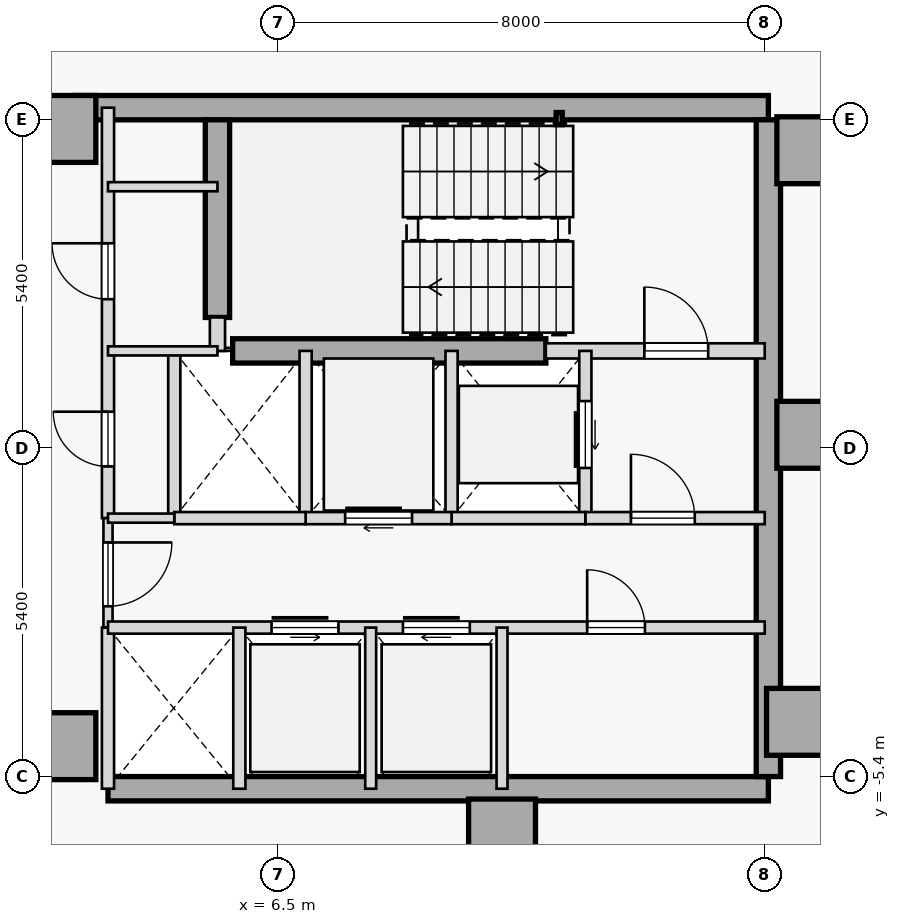
"""IFC4 building model, lengths in metres.
Left out: names, types, materials, properties, quantities, classifications, styles, units other than length and angle.
Written with IfcOpenShell. Run it as: python <this file> out.ifc"""

import sys

from ifc_helpers import new_model, si_unit, direction, frame, frame_2d, origin, origin_2d, place, context, subcontext, project, spatial, rectangle, hollow_rectangle, extrude, element, fill, save


model = new_model("IFC4")
c1 = context("Model", 3, precision=1e-05, world=origin(), true_north=direction((0.0, 1.0)))
c2 = subcontext(c1, "Body", "Model", "MODEL_VIEW")
j1 = project(units=[si_unit("LENGTHUNIT", "METRE"), si_unit("PLANEANGLEUNIT", "RADIAN")], contexts=[c1])
p1 = place(None, origin())
s1 = spatial("IfcSite", under=j1, at=p1, CompositionType="ELEMENT")
p2 = place(p1, origin())
s2 = spatial("IfcBuilding", under=s1, at=p2, CompositionType="ELEMENT")
p3 = place(p2, frame((0.0, 0.0, 117.0)))
s3 = spatial("IfcBuildingStorey", under=s2, at=p3, CompositionType="ELEMENT", Elevation=117.0)
for number, where, z_axis, x_axis in (
    (1, (15.25, 4.9, 0.0), (0.0, 0.0, 1.0), (1.0, 0.0, 0.0)),
    (2, (15.25, 0.22, 0.0), (0.0, 0.0, 1.0), (1.0, 0.0, 0.0)),
    (3, (15.08, -4.5, 0.0), (0.0, 0.0, 1.0), (1.0, 0.0, 0.0)),
    (4, (10.18, -6.32, 0.0), (0.0, 0.0, 1.0), (1.0, 0.0, 0.0)),
    (5, (2.95, -4.9, 0.0), (0.0, 0.0, 1.0), (1.0, 0.0, 0.0)),
    (6, (2.95, 5.25, 0.0), (0.0, 0.0, 1.0), (1.0, 0.0, 0.0)),
):
    element("IfcColumn", number, at=place(p3, frame(where, z_axis=z_axis, x_axis=x_axis)), inside=s3, PredefinedType="COLUMN", context=c2, shape_type="SweptSolid", body=[
        extrude(rectangle(XDim=1.1, YDim=1.1, at=origin_2d()), origin(), (0.0, 0.0, 1.0), 3.7),
    ])
p4 = place(p3, frame((3.15, 5.6, 0.0), z_axis=(0.0, 0.0, 1.0), x_axis=(1.0, 0.0, 0.0)))
e7 = element("IfcWall", 7, at=p4, inside=s3, PredefinedType="SHEAR", context=c2, shape_type="SweptSolid", body=[
    extrude(rectangle(XDim=11.41, YDim=0.4, at=frame_2d((5.705, 0.0))), origin(), (0.0, 0.0, 1.0), 3.475),
])
p5 = place(p3, frame((3.7, -5.6, 0.0), z_axis=(0.0, 0.0, 1.0), x_axis=(1.0, 0.0, 0.0)))
e8 = element("IfcWall", 8, at=p5, inside=s3, PredefinedType="SHEAR", context=c2, shape_type="SweptSolid", body=[
    extrude(rectangle(XDim=10.86, YDim=0.4, at=frame_2d((5.43, 0.0))), origin(), (0.0, 0.0, 1.0), 3.475),
])
p6 = place(p3, frame((14.56, -5.4, 0.0), z_axis=(0.0, 0.0, 1.0), x_axis=(0.0, 1.0, 0.0)))
e9 = element("IfcWall", 9, at=p6, inside=s3, PredefinedType="SHEAR", context=c2, shape_type="SweptSolid", body=[
    extrude(rectangle(XDim=10.8, YDim=0.4, at=frame_2d((5.4, 0.0))), origin(), (0.0, 0.0, 1.0), 3.475),
])
p7 = place(p3, frame((5.5, 2.15, 0.0), z_axis=(0.0, 0.0, 1.0), x_axis=(0.0, 1.0, 0.0)))
e10 = element("IfcWall", 10, at=p7, inside=s3, PredefinedType="SHEAR", context=c2, shape_type="SweptSolid", body=[
    extrude(rectangle(XDim=3.25, YDim=0.4, at=frame_2d((1.625, 0.0))), origin(), (0.0, 0.0, 1.0), 3.475),
])
p8 = place(p3, frame((5.75, 1.6, 0.0), z_axis=(0.0, 0.0, 1.0), x_axis=(1.0, 0.0, 0.0)))
e11 = element("IfcWall", 11, at=p8, inside=s3, PredefinedType="SHEAR", context=c2, shape_type="SweptSolid", body=[
    extrude(rectangle(XDim=5.15, YDim=0.4, at=frame_2d((2.575, 0.0))), origin(), (0.0, 0.0, 1.0), 3.475),
])
p9 = place(p3, frame((11.12, 5.42, 0.0), z_axis=(0.0, 0.0, 1.0), x_axis=(1.0, 0.0, 0.0)))
e12 = element("IfcColumn", 12, at=p9, inside=s3, PredefinedType="COLUMN", context=c2, shape_type="SweptSolid", body=[
    extrude(hollow_rectangle(XDim=0.1, YDim=0.2, WallThickness=0.008, at=origin_2d()), origin(), (0.0, 0.0, 1.0), 3.7),
])
p10 = place(p3, frame((10.9, 1.6, 0.0), z_axis=(0.0, 0.0, 1.0), x_axis=(1.0, 0.0, 0.0)))
e13 = element("IfcWall", 13, at=p10, inside=s3, PredefinedType="STANDARD", context=c2, shape_type="SweptSolid", body=[
    extrude(rectangle(XDim=3.6, YDim=0.25, at=frame_2d((1.8, 0.0))), origin(), (0.0, 0.0, 1.0), 3.475),
])
p11 = place(p10, frame((1.62, 0.0, 0.0)))
e14 = element("IfcOpeningElement", 14, at=p11, cuts=e13, PredefinedType="OPENING", context=c2, shape_type="SweptSolid", body=[
    extrude(rectangle(XDim=1.05, YDim=2.15, at=frame_2d((0.525, 1.075))), frame((0.0, 0.135, 0.0), z_axis=(0.0, -1.0, 0.0), x_axis=(1.0, 0.0, 0.0)), (0.0, 0.0, 1.0), 0.27),
])
p12 = place(p3, frame((5.5, 1.6, 0.0), z_axis=(0.0, 0.0, 1.0), x_axis=(0.0, 1.0, 0.0)))
e15 = element("IfcWall", 15, at=p12, inside=s3, PredefinedType="STANDARD", context=c2, shape_type="SweptSolid", body=[
    extrude(rectangle(XDim=0.55, YDim=0.25, at=frame_2d((0.275, 0.0))), origin(), (0.0, 0.0, 1.0), 3.475),
])
p13 = place(p3, frame((3.7, -1.15, 0.0), z_axis=(0.0, 0.0, 1.0), x_axis=(0.0, 1.0, 0.0)))
e16 = element("IfcWall", 16, at=p13, inside=s3, PredefinedType="STANDARD", context=c2, shape_type="SweptSolid", body=[
    extrude(rectangle(XDim=6.75, YDim=0.2, at=frame_2d((3.375, 0.0))), origin(), (0.0, 0.0, 1.0), 3.475),
])
p14 = place(p13, frame((3.6, 0.0, 0.0)))
e17 = element("IfcOpeningElement", 17, at=p14, cuts=e16, PredefinedType="OPENING", context=c2, shape_type="SweptSolid", body=[
    extrude(rectangle(XDim=0.92, YDim=2.15, at=frame_2d((0.46, 1.075))), frame((0.0, 0.11, 0.0), z_axis=(0.0, -1.0, 0.0), x_axis=(1.0, 0.0, 0.0)), (0.0, 0.0, 1.0), 0.22),
])
p15 = place(p13, frame((0.85, 0.0, 0.0)))
e18 = element("IfcOpeningElement", 18, at=p15, cuts=e16, PredefinedType="OPENING", context=c2, shape_type="SweptSolid", body=[
    extrude(rectangle(XDim=0.9, YDim=2.15, at=frame_2d((0.45, 1.075))), frame((0.0, 0.11, 0.0), z_axis=(0.0, -1.0, 0.0), x_axis=(1.0, 0.0, 0.0)), (0.0, 0.0, 1.0), 0.22),
])
p16 = place(p3, frame((3.7, -2.95, 0.0), z_axis=(0.0, 0.0, 1.0), x_axis=(0.0, 1.0, 0.0)))
e19 = element("IfcWall", 19, at=p16, inside=s3, PredefinedType="PARTITIONING", context=c2, shape_type="SweptSolid", body=[
    extrude(rectangle(XDim=1.8, YDim=0.15, at=frame_2d((0.9, 0.0))), origin(), (0.0, 0.0, 1.0), 3.475),
])
p17 = place(p16, frame((0.35, 0.0, 0.0)))
e20 = element("IfcOpeningElement", 20, at=p17, cuts=e19, PredefinedType="OPENING", context=c2, shape_type="SweptSolid", body=[
    extrude(rectangle(XDim=1.05, YDim=2.18, at=frame_2d((0.525, 1.09))), frame((0.0, 0.085, 0.0), z_axis=(0.0, -1.0, 0.0), x_axis=(1.0, 0.0, 0.0)), (0.0, 0.0, 1.0), 0.17),
])
p18 = place(p3, frame((3.7, -5.6, 0.0), z_axis=(0.0, 0.0, 1.0), x_axis=(0.0, 1.0, 0.0)))
e21 = element("IfcWall", 21, at=p18, inside=s3, PredefinedType="STANDARD", context=c2, shape_type="SweptSolid", body=[
    extrude(rectangle(XDim=2.65, YDim=0.2, at=frame_2d((1.325, 0.0))), origin(), (0.0, 0.0, 1.0), 3.475),
])
p19 = place(p3, frame((11.55, -1.15, 0.0), z_axis=(0.0, 0.0, 1.0), x_axis=(0.0, 1.0, 0.0)))
e22 = element("IfcWall", 22, at=p19, inside=s3, PredefinedType="STANDARD", context=c2, shape_type="SweptSolid", body=[
    extrude(rectangle(XDim=2.75, YDim=0.2, at=frame_2d((1.375, 0.0))), origin(), (0.0, 0.0, 1.0), 3.475),
])
p20 = place(p19, frame((0.825, 0.0, 0.0)))
e23 = element("IfcOpeningElement", 23, at=p20, cuts=e22, PredefinedType="OPENING", context=c2, shape_type="SweptSolid", body=[
    extrude(rectangle(XDim=1.1, YDim=2.15, at=frame_2d((0.55, 1.075))), frame((0.0, 0.11, 0.0), z_axis=(0.0, -1.0, 0.0), x_axis=(1.0, 0.0, 0.0)), (0.0, 0.0, 1.0), 0.22),
])
p21 = place(p3, frame((9.35, -1.15, 0.0), z_axis=(0.0, 0.0, 1.0), x_axis=(0.0, 1.0, 0.0)))
e24 = element("IfcWall", 24, at=p21, inside=s3, PredefinedType="STANDARD", context=c2, shape_type="SweptSolid", body=[
    extrude(rectangle(XDim=2.75, YDim=0.2, at=frame_2d((1.375, 0.0))), origin(), (0.0, 0.0, 1.0), 3.475),
])
p22 = place(p3, frame((11.55, -1.15, 0.0), z_axis=(0.0, 0.0, 1.0), x_axis=(1.0, 0.0, 0.0)))
e25 = element("IfcWall", 25, at=p22, inside=s3, PredefinedType="STANDARD", context=c2, shape_type="SweptSolid", body=[
    extrude(rectangle(XDim=2.95, YDim=0.2, at=frame_2d((1.475, 0.0))), origin(), (0.0, 0.0, 1.0), 3.475),
])
p23 = place(p22, frame((0.75, 0.0, 0.0)))
e26 = element("IfcOpeningElement", 26, at=p23, cuts=e25, PredefinedType="OPENING", context=c2, shape_type="SweptSolid", body=[
    extrude(rectangle(XDim=1.05, YDim=2.18, at=frame_2d((0.525, 1.09))), frame((0.0, 0.11, 0.0), z_axis=(0.0, -1.0, 0.0), x_axis=(1.0, 0.0, 0.0)), (0.0, 0.0, 1.0), 0.22),
])
p24 = place(p3, frame((9.35, -1.15, 0.0), z_axis=(0.0, 0.0, 1.0), x_axis=(1.0, 0.0, 0.0)))
e27 = element("IfcWall", 27, at=p24, inside=s3, PredefinedType="STANDARD", context=c2, shape_type="SweptSolid", body=[
    extrude(rectangle(XDim=2.2, YDim=0.2, at=frame_2d((1.1, 0.0))), origin(), (0.0, 0.0, 1.0), 3.475),
])
p25 = place(p3, frame((6.95, -1.15, 0.0), z_axis=(0.0, 0.0, 1.0), x_axis=(0.0, 1.0, 0.0)))
e28 = element("IfcWall", 28, at=p25, inside=s3, PredefinedType="STANDARD", context=c2, shape_type="SweptSolid", body=[
    extrude(rectangle(XDim=2.75, YDim=0.2, at=frame_2d((1.375, 0.0))), origin(), (0.0, 0.0, 1.0), 3.475),
])
p26 = place(p3, frame((6.95, -1.15, 0.0), z_axis=(0.0, 0.0, 1.0), x_axis=(1.0, 0.0, 0.0)))
e29 = element("IfcWall", 29, at=p26, inside=s3, PredefinedType="STANDARD", context=c2, shape_type="SweptSolid", body=[
    extrude(rectangle(XDim=2.4, YDim=0.2, at=frame_2d((1.2, 0.0))), origin(), (0.0, 0.0, 1.0), 3.475),
])
p27 = place(p26, frame((0.65, 0.0, 0.0)))
e30 = element("IfcOpeningElement", 30, at=p27, cuts=e29, PredefinedType="OPENING", context=c2, shape_type="SweptSolid", body=[
    extrude(rectangle(XDim=1.1, YDim=2.15, at=frame_2d((0.55, 1.075))), frame((0.0, 0.11, 0.0), z_axis=(0.0, -1.0, 0.0), x_axis=(1.0, 0.0, 0.0)), (0.0, 0.0, 1.0), 0.22),
])
p28 = place(p3, frame((4.79, -1.15, 0.0), z_axis=(0.0, 0.0, 1.0), x_axis=(0.0, 1.0, 0.0)))
e31 = element("IfcWall", 31, at=p28, inside=s3, PredefinedType="STANDARD", context=c2, shape_type="SweptSolid", body=[
    extrude(rectangle(XDim=2.75, YDim=0.2, at=frame_2d((1.375, 0.0))), origin(), (0.0, 0.0, 1.0), 3.475),
])
p29 = place(p3, frame((4.79, -1.15, 0.0), z_axis=(0.0, 0.0, 1.0), x_axis=(1.0, 0.0, 0.0)))
e32 = element("IfcWall", 32, at=p29, inside=s3, PredefinedType="STANDARD", context=c2, shape_type="SweptSolid", body=[
    extrude(rectangle(XDim=2.16, YDim=0.2, at=frame_2d((1.08, 0.0))), origin(), (0.0, 0.0, 1.0), 3.475),
])
p30 = place(p3, frame((3.7, -1.15, 0.0), z_axis=(0.0, 0.0, 1.0), x_axis=(1.0, 0.0, 0.0)))
e33 = element("IfcWall", 33, at=p30, inside=s3, PredefinedType="PARTITIONING", context=c2, shape_type="SweptSolid", body=[
    extrude(rectangle(XDim=1.09, YDim=0.15, at=frame_2d((0.545, 0.0))), origin(), (0.0, 0.0, 1.0), 3.475),
])
p31 = place(p3, frame((3.7, -2.95, 0.0), z_axis=(0.0, 0.0, 1.0), x_axis=(1.0, 0.0, 0.0)))
e34 = element("IfcWall", 34, at=p31, inside=s3, PredefinedType="STANDARD", context=c2, shape_type="SweptSolid", body=[
    extrude(rectangle(XDim=10.8, YDim=0.2, at=frame_2d((5.4, 0.0))), origin(), (0.0, 0.0, 1.0), 3.475),
])
p32 = place(p31, frame((2.69, 0.0, 0.0)))
e35 = element("IfcOpeningElement", 35, at=p32, cuts=e34, PredefinedType="OPENING", context=c2, shape_type="SweptSolid", body=[
    extrude(rectangle(XDim=1.1, YDim=2.15, at=frame_2d((0.55, 1.075))), frame((0.0, 0.11, 0.0), z_axis=(0.0, -1.0, 0.0), x_axis=(1.0, 0.0, 0.0)), (0.0, 0.0, 1.0), 0.22),
])
p33 = place(p31, frame((4.85, 0.0, 0.0)))
e36 = element("IfcOpeningElement", 36, at=p33, cuts=e34, PredefinedType="OPENING", context=c2, shape_type="SweptSolid", body=[
    extrude(rectangle(XDim=1.1, YDim=2.15, at=frame_2d((0.55, 1.075))), frame((0.0, 0.11, 0.0), z_axis=(0.0, -1.0, 0.0), x_axis=(1.0, 0.0, 0.0)), (0.0, 0.0, 1.0), 0.22),
])
p34 = place(p31, frame((7.88, 0.0, 0.0)))
e37 = element("IfcOpeningElement", 37, at=p34, cuts=e34, PredefinedType="OPENING", context=c2, shape_type="SweptSolid", body=[
    extrude(rectangle(XDim=0.95, YDim=2.15, at=frame_2d((0.475, 1.075))), frame((0.0, 0.11, 0.0), z_axis=(0.0, -1.0, 0.0), x_axis=(1.0, 0.0, 0.0)), (0.0, 0.0, 1.0), 0.22),
])
p35 = place(p3, frame((5.86, -5.6, 0.0), z_axis=(0.0, 0.0, 1.0), x_axis=(0.0, 1.0, 0.0)))
e38 = element("IfcWall", 38, at=p35, inside=s3, PredefinedType="STANDARD", context=c2, shape_type="SweptSolid", body=[
    extrude(rectangle(XDim=2.65, YDim=0.2, at=frame_2d((1.325, 0.0))), origin(), (0.0, 0.0, 1.0), 3.475),
])
for number, where, z_axis, x_axis in (
    (39, (10.18, -5.6, 0.0), (0.0, 0.0, 1.0), (0.0, 1.0, 0.0)),
    (40, (8.02, -5.6, 0.0), (0.0, 0.0, 1.0), (0.0, 1.0, 0.0)),
):
    element("IfcWall", number, at=place(p3, frame(where, z_axis=z_axis, x_axis=x_axis)), inside=s3, PredefinedType="STANDARD", context=c2, shape_type="SweptSolid", body=[
        extrude(rectangle(XDim=2.65, YDim=0.18, at=frame_2d((1.325, 0.0))), origin(), (0.0, 0.0, 1.0), 3.475),
    ])
for number, where, z_axis, x_axis in (
    (41, (3.7, 4.3, 0.0), (0.0, 0.0, 1.0), (1.0, 0.0, 0.0)),
    (42, (3.7, 1.6, 0.0), (0.0, 0.0, 1.0), (1.0, 0.0, 0.0)),
):
    element("IfcWall", number, at=place(p3, frame(where, z_axis=z_axis, x_axis=x_axis)), inside=s3, PredefinedType="PARTITIONING", context=c2, shape_type="SweptSolid", body=[
        extrude(rectangle(XDim=1.8, YDim=0.15, at=frame_2d((0.9, 0.0))), origin(), (0.0, 0.0, 1.0), 3.475),
    ])
p36 = place(p11, origin())
e43 = element("IfcDoor", 43, at=p36, inside=s3, OperationType="SINGLE_SWING_LEFT", PredefinedType="DOOR", context=c2, shape_type="SweptSolid", body=[
    extrude(rectangle(XDim=1.05, YDim=2.15, at=frame_2d((0.525, 1.075))), frame((0.0, 0.025, 0.0), z_axis=(0.0, -1.0, 0.0), x_axis=(1.0, 0.0, 0.0)), (0.0, 0.0, 1.0), 0.05),
])
fill(e14, e43)
p37 = place(p23, origin())
e44 = element("IfcDoor", 44, at=p37, inside=s3, OperationType="SINGLE_SWING_LEFT", PredefinedType="DOOR", context=c2, shape_type="SweptSolid", body=[
    extrude(rectangle(XDim=1.05, YDim=2.18, at=frame_2d((0.525, 1.09))), frame((0.0, 0.025, 0.0), z_axis=(0.0, -1.0, 0.0), x_axis=(1.0, 0.0, 0.0)), (0.0, 0.0, 1.0), 0.05),
])
fill(e26, e44)
p38 = place(p17, frame((1.05, 0.0, 0.0), z_axis=(0.0, 0.0, 1.0), x_axis=(-1.0, 0.0, 0.0)))
e45 = element("IfcDoor", 45, at=p38, inside=s3, OperationType="SINGLE_SWING_RIGHT", PredefinedType="DOOR", context=c2, shape_type="SweptSolid", body=[
    extrude(rectangle(XDim=1.05, YDim=2.18, at=frame_2d((0.525, 1.09))), frame((0.0, 0.025, 0.0), z_axis=(0.0, -1.0, 0.0), x_axis=(1.0, 0.0, 0.0)), (0.0, 0.0, 1.0), 0.05),
])
fill(e20, e45)
p39 = place(p20, origin())
e46 = element("IfcDoor", 46, at=p39, inside=s3, OperationType="SLIDING_TO_RIGHT", PredefinedType="DOOR", context=c2, shape_type="SweptSolid", body=[
    extrude(rectangle(XDim=1.1, YDim=2.15, at=frame_2d((0.55, 1.075))), frame((0.0, 0.025, 0.0), z_axis=(0.0, -1.0, 0.0), x_axis=(1.0, 0.0, 0.0)), (0.0, 0.0, 1.0), 0.05),
])
fill(e23, e46)
p40 = place(p27, origin())
e47 = element("IfcDoor", 47, at=p40, inside=s3, OperationType="SLIDING_TO_RIGHT", PredefinedType="DOOR", context=c2, shape_type="SweptSolid", body=[
    extrude(rectangle(XDim=1.1, YDim=2.15, at=frame_2d((0.55, 1.075))), frame((0.0, 0.025, 0.0), z_axis=(0.0, -1.0, 0.0), x_axis=(1.0, 0.0, 0.0)), (0.0, 0.0, 1.0), 0.05),
])
fill(e30, e47)
p41 = place(p32, origin())
e48 = element("IfcDoor", 48, at=p41, inside=s3, OperationType="SLIDING_TO_LEFT", PredefinedType="DOOR", context=c2, shape_type="SweptSolid", body=[
    extrude(rectangle(XDim=1.1, YDim=2.15, at=frame_2d((0.55, 1.075))), frame((0.0, 0.025, 0.0), z_axis=(0.0, -1.0, 0.0), x_axis=(1.0, 0.0, 0.0)), (0.0, 0.0, 1.0), 0.05),
])
fill(e35, e48)
p42 = place(p33, origin())
e49 = element("IfcDoor", 49, at=p42, inside=s3, OperationType="SLIDING_TO_RIGHT", PredefinedType="DOOR", context=c2, shape_type="SweptSolid", body=[
    extrude(rectangle(XDim=1.1, YDim=2.15, at=frame_2d((0.55, 1.075))), frame((0.0, 0.025, 0.0), z_axis=(0.0, -1.0, 0.0), x_axis=(1.0, 0.0, 0.0)), (0.0, 0.0, 1.0), 0.05),
])
fill(e36, e49)
p43 = place(p34, origin())
e50 = element("IfcDoor", 50, at=p43, inside=s3, OperationType="SINGLE_SWING_LEFT", PredefinedType="DOOR", context=c2, shape_type="SweptSolid", body=[
    extrude(rectangle(XDim=0.95, YDim=2.15, at=frame_2d((0.475, 1.075))), frame((0.0, 0.025, 0.0), z_axis=(0.0, -1.0, 0.0), x_axis=(1.0, 0.0, 0.0)), (0.0, 0.0, 1.0), 0.05),
])
fill(e37, e50)
p44 = place(p14, origin())
e51 = element("IfcDoor", 51, at=p44, inside=s3, OperationType="SINGLE_SWING_RIGHT", PredefinedType="DOOR", context=c2, shape_type="SweptSolid", body=[
    extrude(rectangle(XDim=0.92, YDim=2.15, at=frame_2d((0.46, 1.075))), frame((0.0, 0.025, 0.0), z_axis=(0.0, -1.0, 0.0), x_axis=(1.0, 0.0, 0.0)), (0.0, 0.0, 1.0), 0.05),
])
fill(e17, e51)
p45 = place(p15, origin())
e52 = element("IfcDoor", 52, at=p45, inside=s3, OperationType="SINGLE_SWING_RIGHT", PredefinedType="DOOR", context=c2, shape_type="SweptSolid", body=[
    extrude(rectangle(XDim=0.9, YDim=2.15, at=frame_2d((0.45, 1.075))), frame((0.0, 0.025, 0.0), z_axis=(0.0, -1.0, 0.0), x_axis=(1.0, 0.0, 0.0)), (0.0, 0.0, 1.0), 0.05),
])
fill(e18, e52)
save(model, sys.argv[1])
